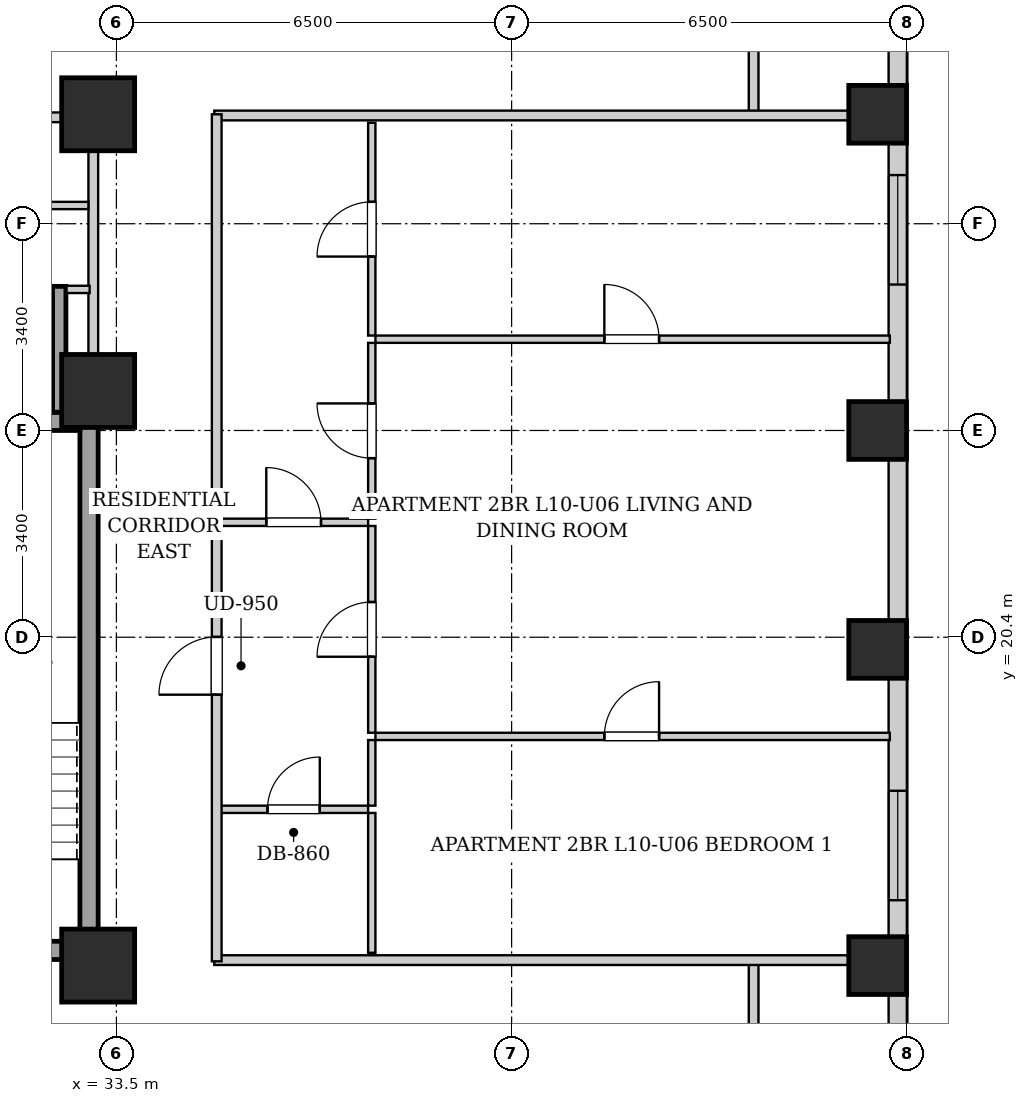
"""IFC4 building model, lengths in metres.
Left out: names, types, materials, properties, quantities, classifications, styles, units other than length and angle.
Written with IfcOpenShell. Run it as: python <this file> out.ifc"""

import sys

from ifc_helpers import new_model, si_unit, direction, frame, frame_2d, origin, origin_2d, place, context, subcontext, project, spatial, rectangle, extrude, element, fill, save


model = new_model("IFC4")
c1 = context("Model", 3, precision=1e-05, world=origin(), true_north=direction((0.0, 1.0)))
c2 = subcontext(c1, "Body", "Model", "MODEL_VIEW")
j1 = project(units=[si_unit("LENGTHUNIT", "METRE"), si_unit("PLANEANGLEUNIT", "RADIAN")], contexts=[c1])
p1 = place(None, origin())
s1 = spatial("IfcSite", under=j1, at=p1, CompositionType="ELEMENT")
p2 = place(p1, origin())
s2 = spatial("IfcBuilding", under=s1, at=p2, CompositionType="ELEMENT")
p3 = place(p2, frame((0.0, 0.0, 41.8)))
s3 = spatial("IfcBuildingStorey", under=s2, at=p3, CompositionType="ELEMENT", Elevation=41.8)
for number, where, z_axis, x_axis in (
    (1, (46.02, 15.0, 0.0), (0.0, 0.0, 1.0), (1.0, 0.0, 0.0)),
    (2, (46.02, 20.2, 0.0), (0.0, 0.0, 1.0), (1.0, 0.0, 0.0)),
    (3, (46.02, 23.8, 0.0), (0.0, 0.0, 1.0), (1.0, 0.0, 0.0)),
    (4, (46.02, 29.0, 0.0), (0.0, 0.0, 1.0), (1.0, 0.0, 0.0)),
):
    element("IfcColumn", number, at=place(p3, frame(where, z_axis=z_axis, x_axis=x_axis)), inside=s3, PredefinedType="COLUMN", context=c2, shape_type="SweptSolid", body=[
        extrude(rectangle(XDim=0.95, YDim=0.95, at=origin_2d()), origin(), (0.0, 0.0, 1.0), 3.2),
    ])
for number, where, z_axis, x_axis in (
    (5, (33.2, 15.0, 0.0), (0.0, 0.0, 1.0), (1.0, 0.0, 0.0)),
    (6, (33.2, 29.0, 0.0), (0.0, 0.0, 1.0), (1.0, 0.0, 0.0)),
    (7, (33.2, 24.45, 0.0), (0.0, 0.0, 1.0), (1.0, 0.0, 0.0)),
):
    element("IfcColumn", number, at=place(p3, frame(where, z_axis=z_axis, x_axis=x_axis)), inside=s3, PredefinedType="COLUMN", context=c2, shape_type="SweptSolid", body=[
        extrude(rectangle(XDim=1.2, YDim=1.2, at=origin_2d()), origin(), (0.0, 0.0, 1.0), 3.2),
    ])
p4 = place(p3, frame((46.35, 45.1, 0.0), z_axis=(0.0, 0.0, 1.0), x_axis=(0.0, -1.0, 0.0)))
e8 = element("IfcWall", 8, at=p4, inside=s3, PredefinedType="SOLIDWALL", context=c2, shape_type="SweptSolid", body=[
    extrude(rectangle(XDim=42.6, YDim=0.3, at=frame_2d((21.3, 0.0))), origin(), (0.0, 0.0, 1.0), 1.975),
])
p5 = place(p4, frame((37.575, 0.0, 0.55)))
e9 = element("IfcOpeningElement", 9, at=p5, cuts=e8, PredefinedType="OPENING", context=c2, shape_type="SweptSolid", body=[
    extrude(rectangle(XDim=1.8, YDim=1.2, at=frame_2d((0.9, 0.6))), frame((0.0, 0.16, 0.0), z_axis=(0.0, -1.0, 0.0), x_axis=(1.0, 0.0, 0.0)), (0.0, 0.0, 1.0), 0.32),
])
p6 = place(p4, frame((34.85, 0.0, 0.55)))
e10 = element("IfcOpeningElement", 10, at=p6, cuts=e8, PredefinedType="OPENING", context=c2, shape_type="SweptSolid", body=[
    extrude(rectangle(XDim=1.35, YDim=1.2, at=frame_2d((0.675, 0.6))), frame((0.0, 0.16, 0.0), z_axis=(0.0, -1.0, 0.0), x_axis=(1.0, 0.0, 0.0)), (0.0, 0.0, 1.0), 0.32),
])
p7 = place(p4, frame((3.665, 0.0, 0.55)))
e11 = element("IfcOpeningElement", 11, at=p7, cuts=e8, PredefinedType="OPENING", context=c2, shape_type="SweptSolid", body=[
    extrude(rectangle(XDim=1.8, YDim=1.2, at=frame_2d((0.9, 0.6))), frame((0.0, 0.16, 0.0), z_axis=(0.0, -1.0, 0.0), x_axis=(1.0, 0.0, 0.0)), (0.0, 0.0, 1.0), 0.32),
])
p8 = place(p4, frame((1.185, 0.0, 0.55)))
e12 = element("IfcOpeningElement", 12, at=p8, cuts=e8, PredefinedType="OPENING", context=c2, shape_type="SweptSolid", body=[
    extrude(rectangle(XDim=1.35, YDim=1.2, at=frame_2d((0.675, 0.6))), frame((0.0, 0.16, 0.0), z_axis=(0.0, -1.0, 0.0), x_axis=(1.0, 0.0, 0.0)), (0.0, 0.0, 1.0), 0.32),
])
p9 = place(p4, frame((27.225, 0.0, 0.55)))
e13 = element("IfcOpeningElement", 13, at=p9, cuts=e8, PredefinedType="OPENING", context=c2, shape_type="SweptSolid", body=[
    extrude(rectangle(XDim=1.8, YDim=1.2, at=frame_2d((0.9, 0.6))), frame((0.0, 0.16, 0.0), z_axis=(0.0, -1.0, 0.0), x_axis=(1.0, 0.0, 0.0)), (0.0, 0.0, 1.0), 0.32),
])
p10 = place(p4, frame((17.1, 0.0, 0.55)))
e14 = element("IfcOpeningElement", 14, at=p10, cuts=e8, PredefinedType="OPENING", context=c2, shape_type="SweptSolid", body=[
    extrude(rectangle(XDim=1.8, YDim=1.2, at=frame_2d((0.9, 0.6))), frame((0.0, 0.16, 0.0), z_axis=(0.0, -1.0, 0.0), x_axis=(1.0, 0.0, 0.0)), (0.0, 0.0, 1.0), 0.32),
])
p11 = place(p3, frame((33.05, 15.1, 0.0), z_axis=(0.0, 0.0, 1.0), x_axis=(0.0, 1.0, 0.0)))
e15 = element("IfcWall", 15, at=p11, inside=s3, PredefinedType="SHEAR", context=c2, shape_type="SweptSolid", body=[
    extrude(rectangle(XDim=9.0, YDim=0.3, at=frame_2d((4.5, 0.0))), origin(), (0.0, 0.0, 1.0), 2.94),
])
p12 = place(p3, frame((30.05, 23.95, 0.0), z_axis=(0.0, 0.0, 1.0), x_axis=(1.0, 0.0, 0.0)))
e16 = element("IfcWall", 16, at=p12, inside=s3, PredefinedType="SHEAR", context=c2, shape_type="SweptSolid", body=[
    extrude(rectangle(XDim=2.85, YDim=0.3, at=frame_2d((1.425, 0.0))), origin(), (0.0, 0.0, 1.0), 2.94),
])
p13 = place(p3, frame((30.05, 15.25, 0.0), z_axis=(0.0, 0.0, 1.0), x_axis=(1.0, 0.0, 0.0)))
e17 = element("IfcWall", 17, at=p13, inside=s3, PredefinedType="SHEAR", context=c2, shape_type="SweptSolid", body=[
    extrude(rectangle(XDim=2.85, YDim=0.3, at=frame_2d((1.425, 0.0))), origin(), (0.0, 0.0, 1.0), 2.94),
])
p14 = place(p13, frame((0.86, 0.0, 0.0)))
e18 = element("IfcOpeningElement", 18, at=p14, cuts=e17, PredefinedType="OPENING", context=c2, shape_type="SweptSolid", body=[
    extrude(rectangle(XDim=1.1, YDim=2.05, at=frame_2d((0.55, 1.025))), frame((0.0, 0.16, 0.0), z_axis=(0.0, -1.0, 0.0), x_axis=(1.0, 0.0, 0.0)), (0.0, 0.0, 1.0), 0.32),
])
p15 = place(p3, frame((32.56, 24.1, 0.0), z_axis=(0.0, 0.0, 1.0), x_axis=(0.0, 1.0, 0.0)))
e19 = element("IfcWall", 19, at=p15, inside=s3, PredefinedType="SHEAR", context=c2, shape_type="SweptSolid", body=[
    extrude(rectangle(XDim=2.07, YDim=0.22, at=frame_2d((1.035, 0.0))), origin(), (0.0, 0.0, 1.0), 2.94),
])
p16 = place(p3, frame((33.12, 24.12, 0.0), z_axis=(0.0, 0.0, 1.0), x_axis=(0.0, 1.0, 0.0)))
e20 = element("IfcWall", 20, at=p16, inside=s3, PredefinedType="PARTITIONING", context=c2, shape_type="SweptSolid", body=[
    extrude(rectangle(XDim=4.76, YDim=0.16, at=frame_2d((2.38, 0.0))), origin(), (0.0, 0.0, 1.0), 2.94),
])
p17 = place(p3, frame((32.68, 26.12, 0.0), z_axis=(0.0, 0.0, 1.0), x_axis=(1.0, 0.0, 0.0)))
e21 = element("IfcWall", 21, at=p17, inside=s3, PredefinedType="PARTITIONING", context=c2, shape_type="SweptSolid", body=[
    extrude(rectangle(XDim=0.38, YDim=0.12, at=frame_2d((0.19, 0.0))), origin(), (0.0, 0.0, 1.0), 2.94),
])
p18 = place(p3, frame((30.16, 27.5, 0.0), z_axis=(0.0, 0.0, 1.0), x_axis=(1.0, 0.0, 0.0)))
e22 = element("IfcWall", 22, at=p18, inside=s3, PredefinedType="PARTITIONING", context=c2, shape_type="SweptSolid", body=[
    extrude(rectangle(XDim=2.88, YDim=0.12, at=frame_2d((1.44, 0.0))), origin(), (0.0, 0.0, 1.0), 2.94),
])
p19 = place(p18, frame((0.97, 0.0, 0.0)))
e23 = element("IfcOpeningElement", 23, at=p19, cuts=e22, PredefinedType="OPENING", context=c2, shape_type="SweptSolid", body=[
    extrude(rectangle(XDim=0.86, YDim=2.05, at=frame_2d((0.43, 1.025))), frame((0.0, 0.07, 0.0), z_axis=(0.0, -1.0, 0.0), x_axis=(1.0, 0.0, 0.0)), (0.0, 0.0, 1.0), 0.14),
])
p20 = place(p3, frame((30.08, 28.95, 0.0), z_axis=(0.0, 0.0, 1.0), x_axis=(1.0, 0.0, 0.0)))
e24 = element("IfcWall", 24, at=p20, inside=s3, PredefinedType="PARTITIONING", context=c2, shape_type="SweptSolid", body=[
    extrude(rectangle(XDim=2.96, YDim=0.16, at=frame_2d((1.48, 0.0))), origin(), (0.0, 0.0, 1.0), 2.94),
])
p21 = place(p20, frame((1.045, 0.0, 0.0)))
e25 = element("IfcOpeningElement", 25, at=p21, cuts=e24, PredefinedType="OPENING", context=c2, shape_type="SweptSolid", body=[
    extrude(rectangle(XDim=0.86, YDim=2.05, at=frame_2d((0.43, 1.025))), frame((0.0, 0.09, 0.0), z_axis=(0.0, -1.0, 0.0), x_axis=(1.0, 0.0, 0.0)), (0.0, 0.0, 1.0), 0.18),
])
for number, where, z_axis, x_axis in (
    (26, (43.98, 13.35, 0.0), (0.0, 0.0, 1.0), (0.0, 1.0, 0.0)),
    (27, (43.98, 28.98, 0.0), (0.0, 0.0, 1.0), (0.0, 1.0, 0.0)),
):
    element("IfcWall", number, at=place(p3, frame(where, z_axis=z_axis, x_axis=x_axis)), inside=s3, PredefinedType="PARTITIONING", context=c2, shape_type="SweptSolid", body=[
        extrude(rectangle(XDim=1.74, YDim=0.16, at=frame_2d((0.87, 0.0))), origin(), (0.0, 0.0, 1.0), 2.94),
    ])
for number, where, z_axis, x_axis in (
    (28, (35.11, 15.09, 0.0), (0.0, 0.0, 1.0), (1.0, 0.0, 0.0)),
    (29, (35.11, 28.98, 0.0), (0.0, 0.0, 1.0), (1.0, 0.0, 0.0)),
):
    element("IfcWall", number, at=place(p3, frame(where, z_axis=z_axis, x_axis=x_axis)), inside=s3, PredefinedType="PARTITIONING", context=c2, shape_type="SweptSolid", body=[
        extrude(rectangle(XDim=11.11, YDim=0.16, at=frame_2d((5.555, 0.0))), origin(), (0.0, 0.0, 1.0), 2.155),
    ])
p22 = place(p3, frame((35.19, 22.29, 0.0), z_axis=(0.0, 0.0, 1.0), x_axis=(1.0, 0.0, 0.0)))
e30 = element("IfcWall", 30, at=p22, inside=s3, PredefinedType="PARTITIONING", context=c2, shape_type="SweptSolid", body=[
    extrude(rectangle(XDim=2.45, YDim=0.12, at=frame_2d((1.225, 0.0))), origin(), (0.0, 0.0, 1.0), 2.94),
])
p23 = place(p22, frame((0.775, 0.0, 0.0)))
e31 = element("IfcOpeningElement", 31, at=p23, cuts=e30, PredefinedType="OPENING", context=c2, shape_type="SweptSolid", body=[
    extrude(rectangle(XDim=0.9, YDim=2.05, at=frame_2d((0.45, 1.025))), frame((0.0, 0.07, 0.0), z_axis=(0.0, -1.0, 0.0), x_axis=(1.0, 0.0, 0.0)), (0.0, 0.0, 1.0), 0.14),
])
p24 = place(p3, frame((37.7, 22.35, 0.0), z_axis=(0.0, 0.0, 1.0), x_axis=(0.0, 1.0, 0.0)))
e32 = element("IfcWall", 32, at=p24, inside=s3, PredefinedType="PARTITIONING", context=c2, shape_type="SweptSolid", body=[
    extrude(rectangle(XDim=2.891, YDim=0.12, at=frame_2d((1.445, 0.0))), origin(), (0.0, 0.0, 1.0), 2.94),
])
p25 = place(p24, frame((0.995, 0.0, 0.0)))
e33 = element("IfcOpeningElement", 33, at=p25, cuts=e32, PredefinedType="OPENING", context=c2, shape_type="SweptSolid", body=[
    extrude(rectangle(XDim=0.9, YDim=2.05, at=frame_2d((0.45, 1.025))), frame((0.0, 0.07, 0.0), z_axis=(0.0, -1.0, 0.0), x_axis=(1.0, 0.0, 0.0)), (0.0, 0.0, 1.0), 0.14),
])
p26 = place(p3, frame((37.7, 25.361, 0.0), z_axis=(0.0, 0.0, 1.0), x_axis=(0.0, 1.0, 0.0)))
e34 = element("IfcWall", 34, at=p26, inside=s3, PredefinedType="PARTITIONING", context=c2, shape_type="SweptSolid", body=[
    extrude(rectangle(XDim=3.499, YDim=0.12, at=frame_2d((1.75, 0.0))), origin(), (0.0, 0.0, 1.0), 2.94),
])
p27 = place(p26, frame((1.299, 0.0, 0.0)))
e35 = element("IfcOpeningElement", 35, at=p27, cuts=e34, PredefinedType="OPENING", context=c2, shape_type="SweptSolid", body=[
    extrude(rectangle(XDim=0.9, YDim=2.05, at=frame_2d((0.45, 1.025))), frame((0.0, 0.07, 0.0), z_axis=(0.0, -1.0, 0.0), x_axis=(1.0, 0.0, 0.0)), (0.0, 0.0, 1.0), 0.14),
])
p28 = place(p3, frame((35.19, 17.57, 0.0), z_axis=(0.0, 0.0, 1.0), x_axis=(1.0, 0.0, 0.0)))
e36 = element("IfcWall", 36, at=p28, inside=s3, PredefinedType="PARTITIONING", context=c2, shape_type="SweptSolid", body=[
    extrude(rectangle(XDim=2.45, YDim=0.12, at=frame_2d((1.225, 0.0))), origin(), (0.0, 0.0, 1.0), 2.94),
])
p29 = place(p28, frame((0.795, 0.0, 0.0)))
e37 = element("IfcOpeningElement", 37, at=p29, cuts=e36, PredefinedType="OPENING", context=c2, shape_type="SweptSolid", body=[
    extrude(rectangle(XDim=0.86, YDim=2.05, at=frame_2d((0.43, 1.025))), frame((0.0, 0.07, 0.0), z_axis=(0.0, -1.0, 0.0), x_axis=(1.0, 0.0, 0.0)), (0.0, 0.0, 1.0), 0.14),
])
p30 = place(p3, frame((37.7, 15.21, 0.0), z_axis=(0.0, 0.0, 1.0), x_axis=(0.0, 1.0, 0.0)))
e38 = element("IfcWall", 38, at=p30, inside=s3, PredefinedType="PARTITIONING", context=c2, shape_type="SweptSolid", body=[
    extrude(rectangle(XDim=2.3, YDim=0.12, at=frame_2d((1.15, 0.0))), origin(), (0.0, 0.0, 1.0), 2.94),
])
p31 = place(p3, frame((37.7, 17.63, 0.0), z_axis=(0.0, 0.0, 1.0), x_axis=(0.0, 1.0, 0.0)))
e39 = element("IfcWall", 39, at=p31, inside=s3, PredefinedType="PARTITIONING", context=c2, shape_type="SweptSolid", body=[
    extrude(rectangle(XDim=1.079, YDim=0.12, at=frame_2d((0.54, 0.0))), origin(), (0.0, 0.0, 1.0), 2.94),
])
p32 = place(p3, frame((37.7, 18.829, 0.0), z_axis=(0.0, 0.0, 1.0), x_axis=(0.0, 1.0, 0.0)))
e40 = element("IfcWall", 40, at=p32, inside=s3, PredefinedType="PARTITIONING", context=c2, shape_type="SweptSolid", body=[
    extrude(rectangle(XDim=3.401, YDim=0.12, at=frame_2d((1.7, 0.0))), origin(), (0.0, 0.0, 1.0), 2.94),
])
p33 = place(p32, frame((1.25, 0.0, 0.0)))
e41 = element("IfcOpeningElement", 41, at=p33, cuts=e40, PredefinedType="OPENING", context=c2, shape_type="SweptSolid", body=[
    extrude(rectangle(XDim=0.9, YDim=2.05, at=frame_2d((0.45, 1.025))), frame((0.0, 0.07, 0.0), z_axis=(0.0, -1.0, 0.0), x_axis=(1.0, 0.0, 0.0)), (0.0, 0.0, 1.0), 0.14),
])
p34 = place(p3, frame((37.76, 18.769, 0.0), z_axis=(0.0, 0.0, 1.0), x_axis=(1.0, 0.0, 0.0)))
e42 = element("IfcWall", 42, at=p34, inside=s3, PredefinedType="PARTITIONING", context=c2, shape_type="SweptSolid", body=[
    extrude(rectangle(XDim=8.46, YDim=0.12, at=frame_2d((4.23, 0.0))), origin(), (0.0, 0.0, 1.0), 2.94),
])
p35 = place(p34, frame((3.765, 0.0, 0.0)))
e43 = element("IfcOpeningElement", 43, at=p35, cuts=e42, PredefinedType="OPENING", context=c2, shape_type="SweptSolid", body=[
    extrude(rectangle(XDim=0.9, YDim=2.05, at=frame_2d((0.45, 1.025))), frame((0.0, 0.07, 0.0), z_axis=(0.0, -1.0, 0.0), x_axis=(1.0, 0.0, 0.0)), (0.0, 0.0, 1.0), 0.14),
])
p36 = place(p3, frame((37.76, 25.301, 0.0), z_axis=(0.0, 0.0, 1.0), x_axis=(1.0, 0.0, 0.0)))
e44 = element("IfcWall", 44, at=p36, inside=s3, PredefinedType="PARTITIONING", context=c2, shape_type="SweptSolid", body=[
    extrude(rectangle(XDim=8.46, YDim=0.12, at=frame_2d((4.23, 0.0))), origin(), (0.0, 0.0, 1.0), 2.94),
])
p37 = place(p36, frame((3.765, 0.0, 0.0)))
e45 = element("IfcOpeningElement", 45, at=p37, cuts=e44, PredefinedType="OPENING", context=c2, shape_type="SweptSolid", body=[
    extrude(rectangle(XDim=0.9, YDim=2.05, at=frame_2d((0.45, 1.025))), frame((0.0, 0.07, 0.0), z_axis=(0.0, -1.0, 0.0), x_axis=(1.0, 0.0, 0.0)), (0.0, 0.0, 1.0), 0.14),
])
p38 = place(p3, frame((35.15, 15.07, 0.0), z_axis=(0.0, 0.0, 1.0), x_axis=(0.0, 1.0, 0.0)))
e46 = element("IfcWall", 46, at=p38, inside=s3, PredefinedType="PARTITIONING", context=c2, shape_type="SweptSolid", body=[
    extrude(rectangle(XDim=13.93, YDim=0.16, at=frame_2d((6.965, 0.0))), origin(), (0.0, 0.0, 1.0), 2.94),
])
p39 = place(p38, frame((4.385, 0.0, 0.0)))
e47 = element("IfcOpeningElement", 47, at=p39, cuts=e46, PredefinedType="OPENING", context=c2, shape_type="SweptSolid", body=[
    extrude(rectangle(XDim=0.95, YDim=2.1, at=frame_2d((0.475, 1.05))), frame((0.0, 0.09, 0.0), z_axis=(0.0, -1.0, 0.0), x_axis=(1.0, 0.0, 0.0)), (0.0, 0.0, 1.0), 0.18),
])
p40 = place(p23, origin())
e48 = element("IfcDoor", 48, at=p40, inside=s3, OperationType="SINGLE_SWING_LEFT", PredefinedType="DOOR", context=c2, shape_type="SweptSolid", body=[
    extrude(rectangle(XDim=0.9, YDim=2.05, at=frame_2d((0.45, 1.025))), frame((0.0, 0.025, 0.0), z_axis=(0.0, -1.0, 0.0), x_axis=(1.0, 0.0, 0.0)), (0.0, 0.0, 1.0), 0.05),
])
fill(e31, e48)
p41 = place(p25, origin())
e49 = element("IfcDoor", 49, at=p41, inside=s3, OperationType="SINGLE_SWING_RIGHT", PredefinedType="DOOR", context=c2, shape_type="SweptSolid", body=[
    extrude(rectangle(XDim=0.9, YDim=2.05, at=frame_2d((0.45, 1.025))), frame((0.0, 0.025, 0.0), z_axis=(0.0, -1.0, 0.0), x_axis=(1.0, 0.0, 0.0)), (0.0, 0.0, 1.0), 0.05),
])
fill(e33, e49)
p42 = place(p27, origin())
e50 = element("IfcDoor", 50, at=p42, inside=s3, OperationType="SINGLE_SWING_LEFT", PredefinedType="DOOR", context=c2, shape_type="SweptSolid", body=[
    extrude(rectangle(XDim=0.9, YDim=2.05, at=frame_2d((0.45, 1.025))), frame((0.0, 0.025, 0.0), z_axis=(0.0, -1.0, 0.0), x_axis=(1.0, 0.0, 0.0)), (0.0, 0.0, 1.0), 0.05),
])
fill(e35, e50)
p43 = place(p29, origin())
e51 = element("IfcDoor", 51, at=p43, inside=s3, OperationType="SINGLE_SWING_RIGHT", PredefinedType="DOOR", context=c2, shape_type="SweptSolid", body=[
    extrude(rectangle(XDim=0.86, YDim=2.05, at=frame_2d((0.43, 1.025))), frame((0.0, 0.025, 0.0), z_axis=(0.0, -1.0, 0.0), x_axis=(1.0, 0.0, 0.0)), (0.0, 0.0, 1.0), 0.05),
])
fill(e37, e51)
p44 = place(p33, origin())
e52 = element("IfcDoor", 52, at=p44, inside=s3, OperationType="SINGLE_SWING_LEFT", PredefinedType="DOOR", context=c2, shape_type="SweptSolid", body=[
    extrude(rectangle(XDim=0.9, YDim=2.05, at=frame_2d((0.45, 1.025))), frame((0.0, 0.025, 0.0), z_axis=(0.0, -1.0, 0.0), x_axis=(1.0, 0.0, 0.0)), (0.0, 0.0, 1.0), 0.05),
])
fill(e41, e52)
p45 = place(p35, origin())
e53 = element("IfcDoor", 53, at=p45, inside=s3, OperationType="SINGLE_SWING_RIGHT", PredefinedType="DOOR", context=c2, shape_type="SweptSolid", body=[
    extrude(rectangle(XDim=0.9, YDim=2.05, at=frame_2d((0.45, 1.025))), frame((0.0, 0.025, 0.0), z_axis=(0.0, -1.0, 0.0), x_axis=(1.0, 0.0, 0.0)), (0.0, 0.0, 1.0), 0.05),
])
fill(e43, e53)
p46 = place(p37, origin())
e54 = element("IfcDoor", 54, at=p46, inside=s3, OperationType="SINGLE_SWING_LEFT", PredefinedType="DOOR", context=c2, shape_type="SweptSolid", body=[
    extrude(rectangle(XDim=0.9, YDim=2.05, at=frame_2d((0.45, 1.025))), frame((0.0, 0.025, 0.0), z_axis=(0.0, -1.0, 0.0), x_axis=(1.0, 0.0, 0.0)), (0.0, 0.0, 1.0), 0.05),
])
fill(e45, e54)
p47 = place(p39, origin())
e55 = element("IfcDoor", 55, at=p47, inside=s3, OperationType="SINGLE_SWING_LEFT", PredefinedType="DOOR", context=c2, shape_type="SweptSolid", body=[
    extrude(rectangle(XDim=0.95, YDim=2.1, at=frame_2d((0.475, 1.05))), frame((0.0, 0.025, 0.0), z_axis=(0.0, -1.0, 0.0), x_axis=(1.0, 0.0, 0.0)), (0.0, 0.0, 1.0), 0.05),
])
fill(e47, e55)
p48 = place(p9, origin())
e56 = element("IfcWindow", 56, at=p48, inside=s3, PartitioningType="DOUBLE_PANEL_VERTICAL", PredefinedType="WINDOW", context=c2, shape_type="SweptSolid", body=[
    extrude(rectangle(XDim=1.8, YDim=1.2, at=frame_2d((0.9, 0.6))), frame((0.0, 0.03, 0.0), z_axis=(0.0, -1.0, 0.0), x_axis=(1.0, 0.0, 0.0)), (0.0, 0.0, 1.0), 0.06),
])
fill(e13, e56)
p49 = place(p10, origin())
e57 = element("IfcWindow", 57, at=p49, inside=s3, PartitioningType="DOUBLE_PANEL_VERTICAL", PredefinedType="WINDOW", context=c2, shape_type="SweptSolid", body=[
    extrude(rectangle(XDim=1.8, YDim=1.2, at=frame_2d((0.9, 0.6))), frame((0.0, 0.03, 0.0), z_axis=(0.0, -1.0, 0.0), x_axis=(1.0, 0.0, 0.0)), (0.0, 0.0, 1.0), 0.06),
])
fill(e14, e57)
save(model, sys.argv[1])
